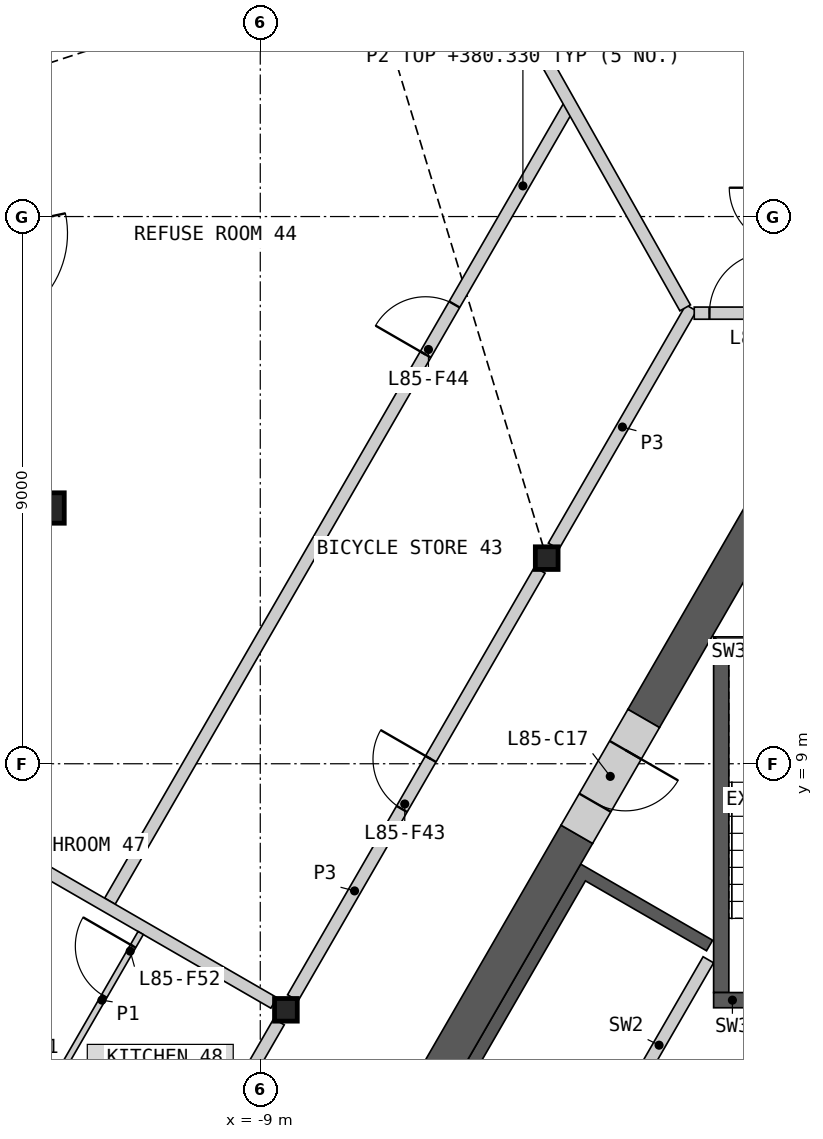
"""IFC4 building model, lengths in metres.
Left out: names, types, materials, properties, quantities, classifications, styles, units other than length and angle.
Written with IfcOpenShell. Run it as: python <this file> out.ifc"""

import sys

from ifc_helpers import new_model, si_unit, direction, frame, frame_2d, origin, origin_2d, place, context, subcontext, project, spatial, polyline, rectangle, hollow_rectangle, i_section, outline, extrude, element, fill, save


model = new_model("IFC4")
c1 = context("Model", 3, precision=1e-05, world=origin(), true_north=direction((0.0, 1.0)))
c2 = subcontext(c1, "Body", "Model", "MODEL_VIEW")
j1 = project(units=[si_unit("LENGTHUNIT", "METRE"), si_unit("PLANEANGLEUNIT", "RADIAN")], contexts=[c1])
p1 = place(None, origin())
s1 = spatial("IfcSite", under=j1, at=p1, CompositionType="ELEMENT")
p2 = place(p1, origin())
s2 = spatial("IfcBuilding", under=s1, at=p2, CompositionType="ELEMENT")
p3 = place(p2, frame((0.0, 0.0, 378.0)))
s3 = spatial("IfcBuildingStorey", under=s2, at=p3, CompositionType="ELEMENT", Elevation=378.0)
p4 = place(p3, frame((-12.474, 13.206, 0.0), z_axis=(0.0, 0.0, 1.0), x_axis=(1.0, 0.0, 0.0)))
e1 = element("IfcColumn", 1, at=p4, inside=s3, PredefinedType="COLUMN", context=c2, shape_type="SweptSolid", body=[
    extrude(hollow_rectangle(XDim=0.5, YDim=0.5, WallThickness=0.03, at=origin_2d()), origin(), (0.0, 0.0, 1.0), 3.4),
])
for number, where, z_axis, x_axis in (
    (2, (-4.289, 12.382, 0.0), (0.0, 0.0, 1.0), (1.0, 0.0, 0.0)),
    (3, (-8.578, 4.953, 0.0), (0.0, 0.0, 1.0), (1.0, 0.0, 0.0)),
):
    element("IfcColumn", number, at=place(p3, frame(where, z_axis=z_axis, x_axis=x_axis)), inside=s3, PredefinedType="COLUMN", context=c2, shape_type="SweptSolid", body=[
        extrude(i_section(OverallWidth=0.374, OverallDepth=0.372, WebThickness=0.016, FlangeThickness=0.026, at=origin_2d()), origin(), (0.0, 0.0, 1.0), 3.4),
    ])
p5 = place(p3, origin())
e4 = element("IfcWall", 4, at=p5, inside=s3, PredefinedType="SHEAR", context=c2, shape_type="SweptSolid", body=[
    extrude(outline(polyline([(-4.96, 0.208), (-7.131, 1.461), (-3.731, 7.35), (-1.561, 6.097), (-1.66, 5.924), (-3.652, 7.074), (-6.852, 1.531), (-4.861, 0.381), (-4.96, 0.208)])), origin(), (0.0, 0.0, 1.0), 3.1),
])
p6 = place(p3, frame((-1.631, 5.776, 0.0), z_axis=(0.0, 0.0, 1.0), x_axis=(-0.499992876559, -0.866029516466, 0.0)))
e5 = element("IfcWall", 5, at=p6, inside=s3, PredefinedType="SOLIDWALL", context=c2, shape_type="SweptSolid", body=[
    extrude(rectangle(XDim=6.486, YDim=0.2, at=frame_2d((3.243, 0.0))), origin(), (0.0, 0.0, 1.0), 3.1),
])
p7 = place(p6, frame((2.637, 0.0, 0.0)))
e6 = element("IfcOpeningElement", 6, at=p7, cuts=e5, PredefinedType="OPENING", context=c2, shape_type="SweptSolid", body=[
    extrude(rectangle(XDim=0.9, YDim=2.1, at=frame_2d((0.45, 1.05))), frame((0.0, 0.11, 0.0), z_axis=(0.0, -1.0, 0.0), x_axis=(1.0, 0.0, 0.0)), (0.0, 0.0, 1.0), 0.22),
])
p8 = place(p3, origin())
e7 = element("IfcWall", 7, at=p8, inside=s3, PredefinedType="SHEAR", context=c2, shape_type="SweptSolid", body=[
    extrude(outline(polyline([(1.544, 11.087), (-1.544, 11.087), (-1.294, 10.837), (1.294, 10.837), (1.544, 11.087)])), origin(), (0.0, 0.0, 1.0), 3.1),
])
p9 = place(p3, origin())
e8 = element("IfcWall", 8, at=p9, inside=s3, PredefinedType="SHEAR", context=c2, shape_type="SweptSolid", body=[
    extrude(outline(polyline([(-1.294, 10.837), (-1.544, 11.087), (-1.544, 5.237), (-1.294, 5.237), (-1.294, 10.837)])), origin(), (0.0, 0.0, 1.0), 3.1),
])
p10 = place(p3, frame((1.544, 5.112, 0.0), z_axis=(0.0, 0.0, 1.0), x_axis=(-1.0, 0.0, 0.0)))
e9 = element("IfcWall", 9, at=p10, inside=s3, PredefinedType="SHEAR", context=c2, shape_type="SweptSolid", body=[
    extrude(rectangle(XDim=3.088, YDim=0.25, at=frame_2d((1.544, 0.0))), origin(), (0.0, 0.0, 1.0), 3.1),
])
p11 = place(p10, frame((0.994, 0.0, 0.0)))
e10 = element("IfcOpeningElement", 10, at=p11, cuts=e9, PredefinedType="OPENING", context=c2, shape_type="SweptSolid", body=[
    extrude(rectangle(XDim=1.1, YDim=2.1, at=frame_2d((0.55, 1.05))), frame((0.0, 0.135, 0.0), z_axis=(0.0, -1.0, 0.0), x_axis=(1.0, 0.0, 0.0)), (0.0, 0.0, 1.0), 0.27),
])
p12 = place(p3, frame((-3.794, 7.84, 0.0), z_axis=(0.0, 0.0, 1.0), x_axis=(-0.499974747889, -0.866039982607, 0.0)))
e11 = element("IfcWall", 11, at=p12, inside=s3, PredefinedType="SHEAR", context=c2, shape_type="SweptSolid", body=[
    extrude(rectangle(XDim=7.092, YDim=0.6, at=frame_2d((3.546, 0.0))), origin(), (0.0, 0.0, 1.0), 3.1),
])
p13 = place(p3, frame((-0.26, 13.961, 0.0), z_axis=(0.0, 0.0, 1.0), x_axis=(-0.50000604952, -0.866021911064, 0.0)))
e12 = element("IfcWall", 12, at=p13, inside=s3, PredefinedType="SHEAR", context=c2, shape_type="SweptSolid", body=[
    extrude(rectangle(XDim=4.869, YDim=0.6, at=frame_2d((2.434, 0.0))), origin(), (0.0, 0.0, 1.0), 3.1),
])
p14 = place(p3, frame((-2.694, 9.745, 0.0), z_axis=(0.0, 0.0, 1.0), x_axis=(-0.50002983664, -0.866008176907, 0.0)))
e13 = element("IfcWall", 13, at=p14, inside=s3, PredefinedType="SHEAR", context=c2, shape_type="SweptSolid", body=[
    extrude(rectangle(XDim=2.2, YDim=0.6, at=frame_2d((1.1, 0.0))), origin(), (0.0, 0.0, 1.0), 3.1),
])
p15 = place(p14, frame((0.6, 0.0, 0.0)))
e14 = element("IfcOpeningElement", 14, at=p15, cuts=e13, PredefinedType="OPENING", context=c2, shape_type="SweptSolid", body=[
    extrude(rectangle(XDim=1.0, YDim=2.1, at=frame_2d((0.5, 1.05))), frame((0.0, 0.31, 0.0), z_axis=(0.0, -1.0, 0.0), x_axis=(1.0, 0.0, 0.0)), (0.0, 0.0, 1.0), 0.62),
])
p16 = place(p3, frame((-8.465, 5.15, 0.0), z_axis=(0.0, 0.0, 1.0), x_axis=(0.499992155518, 0.866029932751, 0.0)))
e15 = element("IfcWall", 15, at=p16, inside=s3, PredefinedType="PARTITIONING", context=c2, shape_type="SweptSolid", body=[
    extrude(rectangle(XDim=8.123, YDim=0.2, at=frame_2d((4.062, 0.0))), origin(), (0.0, 0.0, 1.0), 3.1),
])
p17 = place(p16, frame((3.587, 0.0, 0.0)))
e16 = element("IfcOpeningElement", 16, at=p17, cuts=e15, PredefinedType="OPENING", context=c2, shape_type="SweptSolid", body=[
    extrude(rectangle(XDim=0.95, YDim=2.1, at=frame_2d((0.475, 1.05))), frame((0.0, 0.11, 0.0), z_axis=(0.0, -1.0, 0.0), x_axis=(1.0, 0.0, 0.0)), (0.0, 0.0, 1.0), 0.22),
])
p18 = place(p3, frame((-12.754, -2.279, 0.0), z_axis=(0.0, 0.0, 1.0), x_axis=(0.500001682468, 0.866024432409, 0.0)))
e17 = element("IfcWall", 17, at=p18, inside=s3, PredefinedType="PARTITIONING", context=c2, shape_type="SweptSolid", body=[
    extrude(rectangle(XDim=8.124, YDim=0.2, at=frame_2d((4.062, 0.0))), origin(), (0.0, 0.0, 1.0), 3.1),
])
p19 = place(p18, frame((3.762, 0.0, 0.0)))
e18 = element("IfcOpeningElement", 18, at=p19, cuts=e17, PredefinedType="OPENING", context=c2, shape_type="SweptSolid", body=[
    extrude(rectangle(XDim=1.0, YDim=2.1, at=frame_2d((0.5, 1.05))), frame((0.0, 0.11, 0.0), z_axis=(0.0, -1.0, 0.0), x_axis=(1.0, 0.0, 0.0)), (0.0, 0.0, 1.0), 0.22),
])
p20 = place(p3, frame((-4.176, 12.579, 0.0), z_axis=(0.0, 0.0, 1.0), x_axis=(0.499974648164, 0.866040040179, 0.0)))
e19 = element("IfcWall", 19, at=p20, inside=s3, PredefinedType="PARTITIONING", context=c2, shape_type="SweptSolid", body=[
    extrude(rectangle(XDim=4.525, YDim=0.2, at=frame_2d((2.263, 0.0))), origin(), (0.0, 0.0, 1.0), 3.1),
])
p21 = place(p3, frame((-1.863, 16.411, 0.0), z_axis=(0.0, 0.0, 1.0), x_axis=(1.0, 0.0, 0.0)))
e20 = element("IfcWall", 20, at=p21, inside=s3, PredefinedType="PARTITIONING", context=c2, shape_type="SweptSolid", body=[
    extrude(rectangle(XDim=3.701, YDim=0.2, at=frame_2d((1.851, 0.0))), origin(), (0.0, 0.0, 1.0), 3.1),
])
p22 = place(p21, frame((0.25, 0.0, 0.0)))
e21 = element("IfcOpeningElement", 21, at=p22, cuts=e20, PredefinedType="OPENING", context=c2, shape_type="SweptSolid", body=[
    extrude(rectangle(XDim=1.0, YDim=2.1, at=frame_2d((0.5, 1.05))), frame((0.0, 0.11, 0.0), z_axis=(0.0, -1.0, 0.0), x_axis=(1.0, 0.0, 0.0)), (0.0, 0.0, 1.0), 0.22),
])
p23 = place(p3, frame((-11.473, 6.74, 0.0), z_axis=(0.0, 0.0, 1.0), x_axis=(0.500001082559, 0.866024778768, 0.0)))
e22 = element("IfcWall", 22, at=p23, inside=s3, PredefinedType="PARTITIONING", context=c2, shape_type="SweptSolid", body=[
    extrude(rectangle(XDim=15.094, YDim=0.2, at=frame_2d((7.547, 0.0))), origin(), (0.0, 0.0, 1.0), 2.33),
])
p24 = place(p23, frame((10.383, 0.0, 0.0)))
e23 = element("IfcOpeningElement", 23, at=p24, cuts=e22, PredefinedType="OPENING", context=c2, shape_type="SweptSolid", body=[
    extrude(rectangle(XDim=0.95, YDim=2.1, at=frame_2d((0.475, 1.05))), frame((0.0, 0.11, 0.0), z_axis=(0.0, -1.0, 0.0), x_axis=(1.0, 0.0, 0.0)), (0.0, 0.0, 1.0), 0.22),
])
p25 = place(p3, frame((-8.865, 28.649, 0.0), z_axis=(0.0, 0.0, 1.0), x_axis=(0.491236420263, -0.871026279401, 0.0)))
e24 = element("IfcWall", 24, at=p25, inside=s3, PredefinedType="PARTITIONING", context=c2, shape_type="SweptSolid", body=[
    extrude(rectangle(XDim=13.95, YDim=0.2, at=frame_2d((6.975, 0.0))), origin(), (0.0, 0.0, 1.0), 2.33),
])
p26 = place(p3, frame((-18.869, 10.894, 0.0), z_axis=(0.0, 0.0, 1.0), x_axis=(0.866023724155, -0.500002909193, 0.0)))
e25 = element("IfcWall", 25, at=p26, inside=s3, PredefinedType="PARTITIONING", context=c2, shape_type="SweptSolid", body=[
    extrude(rectangle(XDim=11.655, YDim=0.2, at=frame_2d((5.827, 0.0))), origin(), (0.0, 0.0, 1.0), 2.33),
])
p27 = place(p3, frame((-15.318, 5.38, 0.0), z_axis=(0.0, 0.0, 1.0), x_axis=(0.866035260786, -0.499982926783, 0.0)))
e26 = element("IfcWall", 26, at=p27, inside=s3, PredefinedType="PARTITIONING", context=c2, shape_type="SweptSolid", body=[
    extrude(rectangle(XDim=5.95, YDim=0.1, at=frame_2d((2.975, 0.0))), origin(), (0.0, 0.0, 1.0), 2.33),
])
p28 = place(p3, frame((-14.735, 5.389, 0.0), z_axis=(0.0, 0.0, 1.0), x_axis=(0.866032775405, -0.499987231761, 0.0)))
e27 = element("IfcWall", 27, at=p28, inside=s3, PredefinedType="PARTITIONING", context=c2, shape_type="SweptSolid", body=[
    extrude(rectangle(XDim=2.9, YDim=0.1, at=frame_2d((1.45, 0.0))), origin(), (0.0, 0.0, 1.0), 2.33),
])
p29 = place(p3, frame((-12.242, 4.008, 0.0), z_axis=(0.0, 0.0, 1.0), x_axis=(0.499948979701, 0.866054858364, 0.0)))
e28 = element("IfcWall", 28, at=p29, inside=s3, PredefinedType="PARTITIONING", context=c2, shape_type="SweptSolid", body=[
    extrude(rectangle(XDim=2.55, YDim=0.1, at=frame_2d((1.275, 0.0))), origin(), (0.0, 0.0, 1.0), 2.33),
])
p30 = place(p29, frame((1.35, 0.0, 0.0)))
e29 = element("IfcOpeningElement", 29, at=p30, cuts=e28, PredefinedType="OPENING", context=c2, shape_type="SweptSolid", body=[
    extrude(rectangle(XDim=0.95, YDim=2.1, at=frame_2d((0.475, 1.05))), frame((0.0, 0.06, 0.0), z_axis=(0.0, -1.0, 0.0), x_axis=(1.0, 0.0, 0.0)), (0.0, 0.0, 1.0), 0.12),
])
p31 = place(p15, origin())
e30 = element("IfcDoor", 30, at=p31, inside=s3, OperationType="SINGLE_SWING_LEFT", PredefinedType="DOOR", context=c2, shape_type="SweptSolid", body=[
    extrude(rectangle(XDim=1.0, YDim=2.1, at=frame_2d((0.5, 1.05))), frame((0.0, 0.055, 0.0), z_axis=(0.0, -1.0, 0.0), x_axis=(1.0, 0.0, 0.0)), (0.0, 0.0, 1.0), 0.05),
])
fill(e14, e30)
p32 = place(p22, origin())
e31 = element("IfcDoor", 31, at=p32, inside=s3, OperationType="SINGLE_SWING_RIGHT", PredefinedType="DOOR", context=c2, shape_type="SweptSolid", body=[
    extrude(rectangle(XDim=1.0, YDim=2.1, at=frame_2d((0.5, 1.05))), frame((0.0, 0.025, 0.0), z_axis=(0.0, -1.0, 0.0), x_axis=(1.0, 0.0, 0.0)), (0.0, 0.0, 1.0), 0.05),
])
fill(e21, e31)
p33 = place(p17, origin())
e32 = element("IfcDoor", 32, at=p33, inside=s3, OperationType="SINGLE_SWING_RIGHT", PredefinedType="DOOR", context=c2, shape_type="SweptSolid", body=[
    extrude(rectangle(XDim=0.95, YDim=2.1, at=frame_2d((0.475, 1.05))), frame((0.0, 0.025, 0.0), z_axis=(0.0, -1.0, 0.0), x_axis=(1.0, 0.0, 0.0)), (0.0, 0.0, 1.0), 0.05),
])
fill(e16, e32)
p34 = place(p24, origin())
e33 = element("IfcDoor", 33, at=p34, inside=s3, OperationType="SINGLE_SWING_LEFT", PredefinedType="DOOR", context=c2, shape_type="SweptSolid", body=[
    extrude(rectangle(XDim=0.95, YDim=2.1, at=frame_2d((0.475, 1.05))), frame((0.0, 0.025, 0.0), z_axis=(0.0, -1.0, 0.0), x_axis=(1.0, 0.0, 0.0)), (0.0, 0.0, 1.0), 0.05),
])
fill(e23, e33)
p35 = place(p30, origin())
e34 = element("IfcDoor", 34, at=p35, inside=s3, OperationType="SINGLE_SWING_RIGHT", PredefinedType="DOOR", context=c2, shape_type="SweptSolid", body=[
    extrude(rectangle(XDim=0.95, YDim=2.1, at=frame_2d((0.475, 1.05))), frame((0.0, 0.025, 0.0), z_axis=(0.0, -1.0, 0.0), x_axis=(1.0, 0.0, 0.0)), (0.0, 0.0, 1.0), 0.05),
])
fill(e29, e34)
save(model, sys.argv[1])
